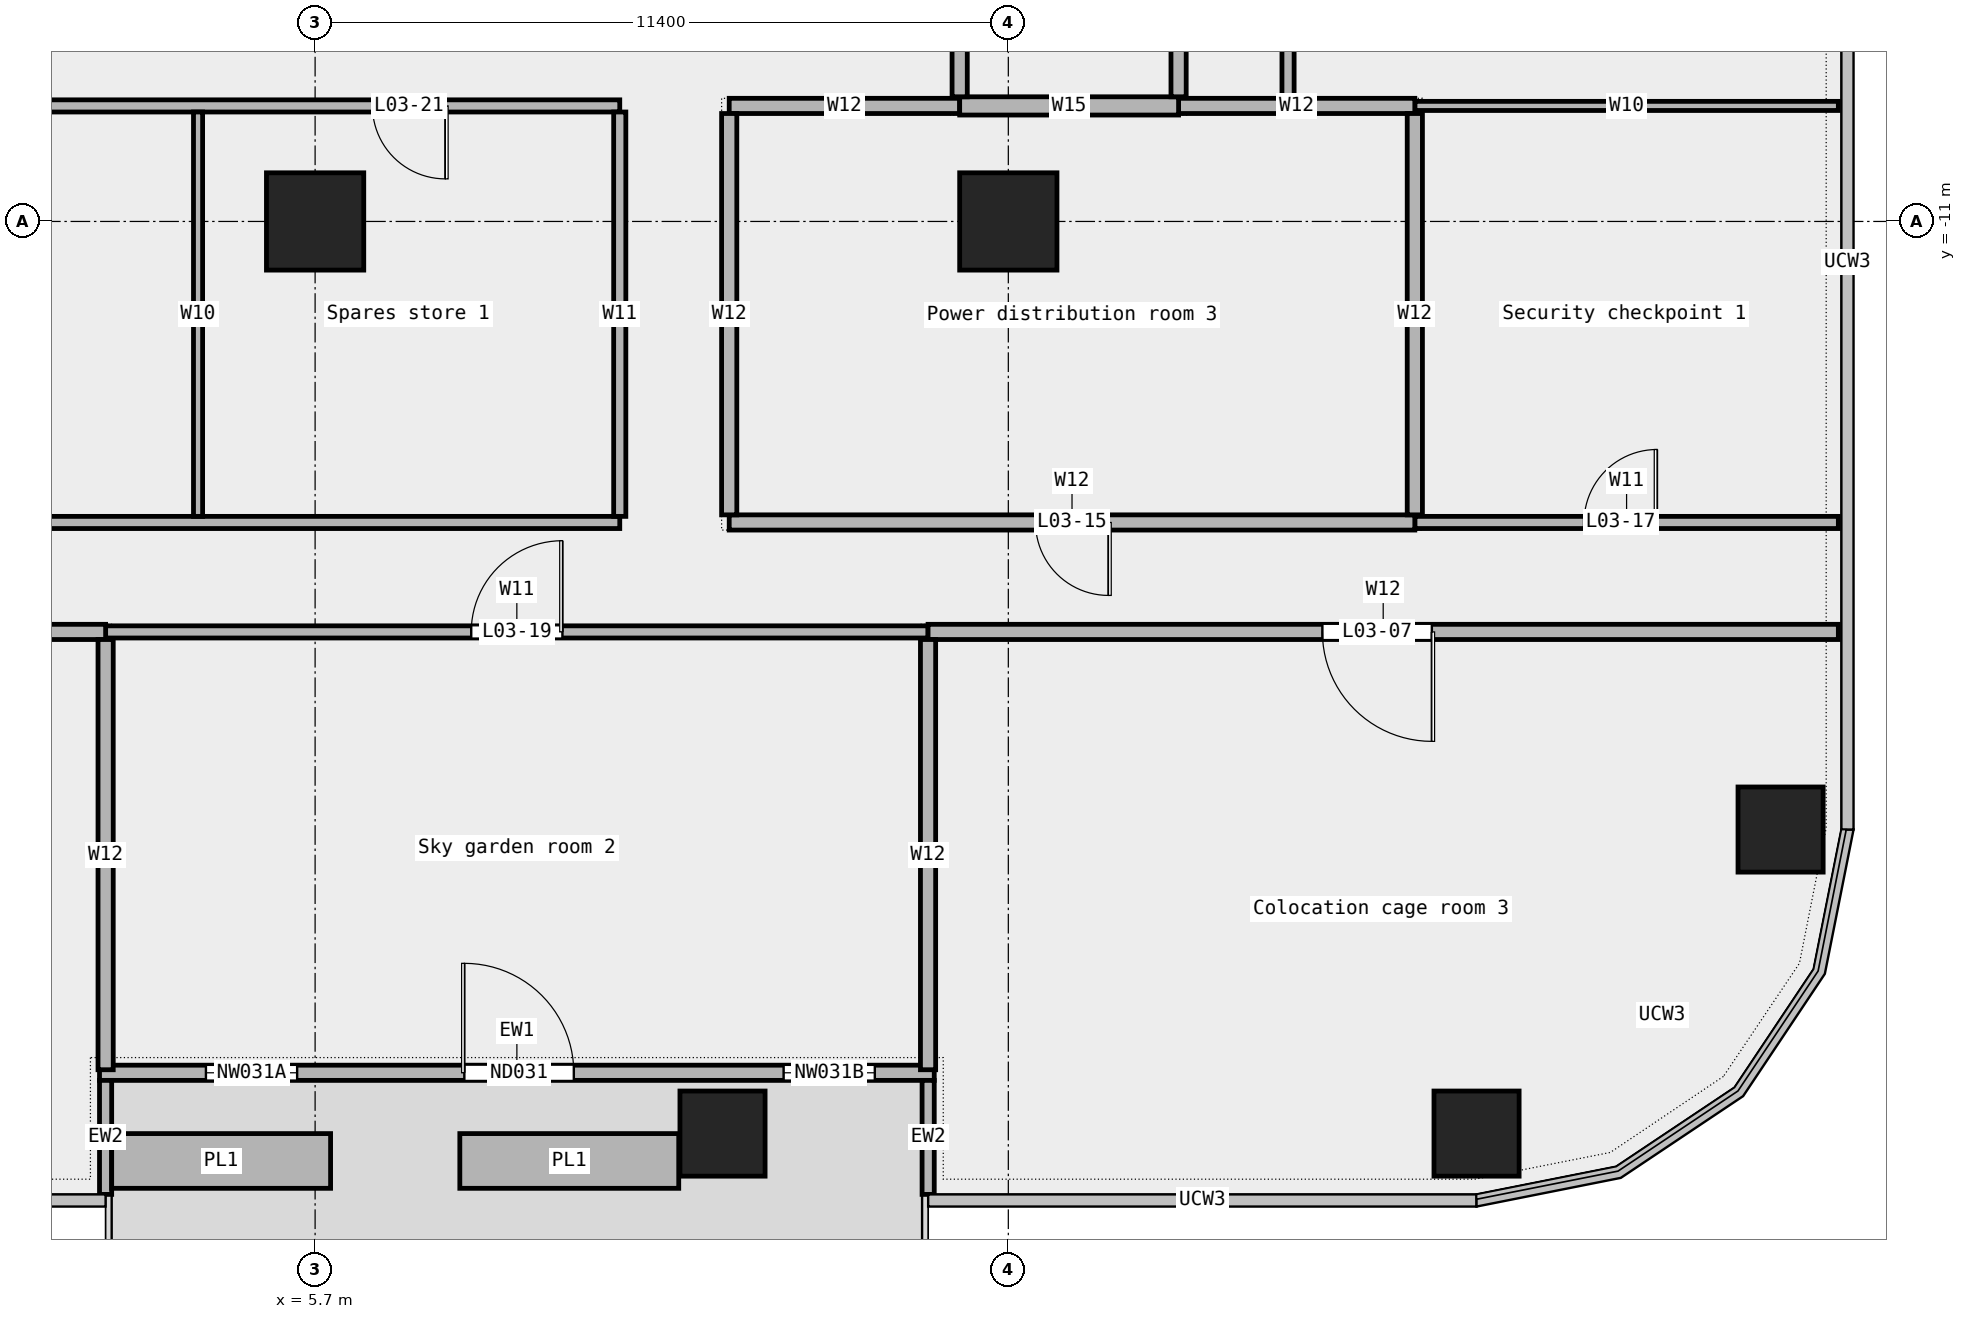
"""IFC4 building model, lengths in metres.
Left out: names, types, materials, properties, quantities, classifications, styles, units other than length and angle.
Written with IfcOpenShell. Run it as: python <this file> out.ifc"""

import sys

from ifc_helpers import new_model, si_unit, direction, frame, frame_2d, origin, origin_2d, place, context, subcontext, project, spatial, rectangle, extrude, element, fill, save


model = new_model("IFC4")
c1 = context("Model", 3, precision=1e-05, world=origin(), true_north=direction((0.0, 1.0)))
c2 = subcontext(c1, "Body", "Model", "MODEL_VIEW")
j1 = project(units=[si_unit("LENGTHUNIT", "METRE"), si_unit("PLANEANGLEUNIT", "RADIAN")], contexts=[c1])
p1 = place(None, origin())
s1 = spatial("IfcSite", under=j1, at=p1, CompositionType="ELEMENT")
p2 = place(p1, origin())
s2 = spatial("IfcBuilding", under=s1, at=p2, CompositionType="ELEMENT")
p3 = place(p2, frame((0.0, 0.0, 20.0)))
s3 = spatial("IfcBuildingStorey", under=s2, at=p3, CompositionType="ELEMENT", Elevation=20.0)
for number, where, z_axis, x_axis in (
    (1, (12.4, -26.0, 0.0), (0.0, 0.0, 1.0), (1.0, 0.0, 0.0)),
    (2, (24.8, -26.0, 0.0), (0.0, 0.0, 1.0), (1.0, 0.0, 0.0)),
    (3, (29.8, -21.0, 0.0), (0.0, 0.0, 1.0), (1.0, 0.0, 0.0)),
):
    element("IfcColumn", number, at=place(p3, frame(where, z_axis=z_axis, x_axis=x_axis)), inside=s3, PredefinedType="COLUMN", context=c2, shape_type="SweptSolid", body=[
        extrude(rectangle(XDim=1.4, YDim=1.4, at=origin_2d()), origin(), (0.0, 0.0, 1.0), 5.0),
    ])
for number, where, z_axis, x_axis in (
    (4, (5.7, -11.0, 0.0), (0.0, 0.0, 1.0), (1.0, 0.0, 0.0)),
    (5, (17.1, -11.0, 0.0), (0.0, 0.0, 1.0), (1.0, 0.0, 0.0)),
):
    element("IfcColumn", number, at=place(p3, frame(where, z_axis=z_axis, x_axis=x_axis)), inside=s3, PredefinedType="COLUMN", context=c2, shape_type="SweptSolid", body=[
        extrude(rectangle(XDim=1.6, YDim=1.6, at=origin_2d()), origin(), (0.0, 0.0, 1.0), 5.0),
    ])
p4 = place(p3, frame((2.155, -25.0, 0.0), z_axis=(0.0, 0.0, 1.0), x_axis=(1.0, 0.0, 0.0)))
e6 = element("IfcWall", 6, at=p4, inside=s3, PredefinedType="STANDARD", context=c2, shape_type="SweptSolid", body=[
    extrude(rectangle(XDim=13.727, YDim=0.25, at=frame_2d((6.864, 0.0))), origin(), (0.0, 0.0, 1.0), 5.0),
])
p5 = place(p4, frame((1.75, 0.0, 0.45)))
e7 = element("IfcOpeningElement", 7, at=p5, cuts=e6, PredefinedType="OPENING", context=c2, shape_type="SweptSolid", body=[
    extrude(rectangle(XDim=1.5, YDim=3.0, at=frame_2d((0.75, 1.5))), frame((0.0, 0.137, 0.0), z_axis=(0.0, -1.0, 0.0), x_axis=(1.0, 0.0, 0.0)), (0.0, 0.0, 1.0), 0.274),
])
p6 = place(p4, frame((6.0, 0.0, 0.0)))
e8 = element("IfcOpeningElement", 8, at=p6, cuts=e6, PredefinedType="OPENING", context=c2, shape_type="SweptSolid", body=[
    extrude(rectangle(XDim=1.8, YDim=2.4, at=frame_2d((0.9, 1.2))), frame((0.0, 0.137, 0.0), z_axis=(0.0, -1.0, 0.0), x_axis=(1.0, 0.0, 0.0)), (0.0, 0.0, 1.0), 0.274),
])
p7 = place(p4, frame((11.25, 0.0, 0.45)))
e9 = element("IfcOpeningElement", 9, at=p7, cuts=e6, PredefinedType="OPENING", context=c2, shape_type="SweptSolid", body=[
    extrude(rectangle(XDim=1.5, YDim=3.0, at=frame_2d((0.75, 1.5))), frame((0.0, 0.137, 0.0), z_axis=(0.0, -1.0, 0.0), x_axis=(1.0, 0.0, 0.0)), (0.0, 0.0, 1.0), 0.274),
])
for number, where, z_axis, x_axis in (
    (10, (2.255, -27.0, 0.0), (0.0, 0.0, 1.0), (0.0, 1.0, 0.0)),
    (11, (15.782, -27.0, 0.0), (0.0, 0.0, 1.0), (0.0, 1.0, 0.0)),
):
    element("IfcWall", number, at=place(p3, frame(where, z_axis=z_axis, x_axis=x_axis)), inside=s3, PredefinedType="STANDARD", context=c2, shape_type="SweptSolid", body=[
        extrude(rectangle(XDim=1.875, YDim=0.2, at=frame_2d((0.938, 0.0))), origin(), (0.0, 0.0, 1.0), 5.0),
    ])
for number, where, z_axis, x_axis in (
    (12, (2.354, -26.45, 0.0), (0.0, 0.0, 1.0), (1.0, 0.0, 0.0)),
    (13, (8.08, -26.45, 0.0), (0.0, 0.0, 1.0), (1.0, 0.0, 0.0)),
):
    element("IfcWall", number, at=place(p3, frame(where, z_axis=z_axis, x_axis=x_axis)), inside=s3, PredefinedType="STANDARD", context=c2, shape_type="SweptSolid", body=[
        extrude(rectangle(XDim=3.6, YDim=0.9, at=frame_2d((1.8, 0.0))), origin(), (0.0, 0.0, 1.0), 0.7),
    ])
p8 = place(p3, frame((2.255, -17.75, 0.0), z_axis=(0.0, 0.0, 1.0), x_axis=(1.0, 0.0, 0.0)))
e14 = element("IfcWall", 14, at=p8, inside=s3, PredefinedType="PARTITIONING", context=c2, shape_type="SweptSolid", body=[
    extrude(rectangle(XDim=13.525, YDim=0.2, at=frame_2d((6.763, 0.0))), origin(), (0.0, 0.0, 1.0), 5.0),
])
p9 = place(p8, frame((6.012, 0.0, 0.0)))
e15 = element("IfcOpeningElement", 15, at=p9, cuts=e14, PredefinedType="OPENING", context=c2, shape_type="SweptSolid", body=[
    extrude(rectangle(XDim=1.5, YDim=2.1, at=frame_2d((0.75, 1.05))), frame((0.0, 0.112, 0.0), z_axis=(0.0, -1.0, 0.0), x_axis=(1.0, 0.0, 0.0)), (0.0, 0.0, 1.0), 0.224),
])
p10 = place(p3, frame((-30.75, -17.75, 0.0), z_axis=(0.0, 0.0, 1.0), x_axis=(1.0, 0.0, 0.0)))
e16 = element("IfcWall", 16, at=p10, inside=s3, PredefinedType="PARTITIONING", context=c2, shape_type="SweptSolid", body=[
    extrude(rectangle(XDim=33.005, YDim=0.25, at=frame_2d((16.502, 0.0))), origin(), (0.0, 0.0, 1.0), 5.0),
])
p11 = place(p10, frame((27.752, 0.0, 0.0)))
e17 = element("IfcOpeningElement", 17, at=p11, cuts=e16, PredefinedType="OPENING", context=c2, shape_type="SweptSolid", body=[
    extrude(rectangle(XDim=1.2, YDim=2.1, at=frame_2d((0.6, 1.05))), frame((0.0, 0.137, 0.0), z_axis=(0.0, -1.0, 0.0), x_axis=(1.0, 0.0, 0.0)), (0.0, 0.0, 1.0), 0.274),
])
p12 = place(p10, frame((11.05, 0.0, 0.0)))
e18 = element("IfcOpeningElement", 18, at=p12, cuts=e16, PredefinedType="OPENING", context=c2, shape_type="SweptSolid", body=[
    extrude(rectangle(XDim=1.8, YDim=2.1, at=frame_2d((0.9, 1.05))), frame((0.0, 0.137, 0.0), z_axis=(0.0, -1.0, 0.0), x_axis=(1.0, 0.0, 0.0)), (0.0, 0.0, 1.0), 0.274),
])
p13 = place(p3, frame((15.78, -17.75, 0.0), z_axis=(0.0, 0.0, 1.0), x_axis=(1.0, 0.0, 0.0)))
e19 = element("IfcWall", 19, at=p13, inside=s3, PredefinedType="PARTITIONING", context=c2, shape_type="SweptSolid", body=[
    extrude(rectangle(XDim=14.97, YDim=0.25, at=frame_2d((7.485, 0.0))), origin(), (0.0, 0.0, 1.0), 5.0),
])
p14 = place(p13, frame((6.485, 0.0, 0.0)))
e20 = element("IfcOpeningElement", 20, at=p14, cuts=e19, PredefinedType="OPENING", context=c2, shape_type="SweptSolid", body=[
    extrude(rectangle(XDim=1.8, YDim=2.1, at=frame_2d((0.9, 1.05))), frame((0.0, 0.137, 0.0), z_axis=(0.0, -1.0, 0.0), x_axis=(1.0, 0.0, 0.0)), (0.0, 0.0, 1.0), 0.274),
])
p15 = place(p3, frame((-10.1, -15.95, 0.0), z_axis=(0.0, 0.0, 1.0), x_axis=(1.0, 0.0, 0.0)))
e21 = element("IfcWall", 21, at=p15, inside=s3, PredefinedType="PARTITIONING", context=c2, shape_type="SweptSolid", body=[
    extrude(rectangle(XDim=20.81, YDim=0.2, at=frame_2d((10.405, 0.0))), origin(), (0.0, 0.0, 1.0), 5.0),
])
p16 = place(p3, frame((23.785, -15.95, 0.0), z_axis=(0.0, 0.0, 1.0), x_axis=(1.0, 0.0, 0.0)))
e22 = element("IfcWall", 22, at=p16, inside=s3, PredefinedType="PARTITIONING", context=c2, shape_type="SweptSolid", body=[
    extrude(rectangle(XDim=6.965, YDim=0.2, at=frame_2d((3.482, 0.0))), origin(), (0.0, 0.0, 1.0), 5.0),
])
p17 = place(p16, frame((2.782, 0.0, 0.0)))
e23 = element("IfcOpeningElement", 23, at=p17, cuts=e22, PredefinedType="OPENING", context=c2, shape_type="SweptSolid", body=[
    extrude(rectangle(XDim=1.2, YDim=2.1, at=frame_2d((0.6, 1.05))), frame((0.0, 0.112, 0.0), z_axis=(0.0, -1.0, 0.0), x_axis=(1.0, 0.0, 0.0)), (0.0, 0.0, 1.0), 0.224),
])
p18 = place(p3, frame((12.51, -15.95, 0.0), z_axis=(0.0, 0.0, 1.0), x_axis=(1.0, 0.0, 0.0)))
e24 = element("IfcWall", 24, at=p18, inside=s3, PredefinedType="PARTITIONING", context=c2, shape_type="SweptSolid", body=[
    extrude(rectangle(XDim=11.275, YDim=0.25, at=frame_2d((5.637, 0.0))), origin(), (0.0, 0.0, 1.0), 5.0),
])
p19 = place(p18, frame((5.038, 0.0, 0.0)))
e25 = element("IfcOpeningElement", 25, at=p19, cuts=e24, PredefinedType="OPENING", context=c2, shape_type="SweptSolid", body=[
    extrude(rectangle(XDim=1.2, YDim=2.1, at=frame_2d((0.6, 1.05))), frame((0.0, 0.137, 0.0), z_axis=(0.0, -1.0, 0.0), x_axis=(1.0, 0.0, 0.0)), (0.0, 0.0, 1.0), 0.274),
])
p20 = place(p3, frame((23.785, -9.1, 0.0), z_axis=(0.0, 0.0, 1.0), x_axis=(1.0, 0.0, 0.0)))
e26 = element("IfcWall", 26, at=p20, inside=s3, PredefinedType="PARTITIONING", context=c2, shape_type="SweptSolid", body=[
    extrude(rectangle(XDim=6.965, YDim=0.15, at=frame_2d((3.482, 0.0))), origin(), (0.0, 0.0, 1.0), 5.0),
])
p21 = place(p3, frame((-10.1, -9.1, 0.0), z_axis=(0.0, 0.0, 1.0), x_axis=(1.0, 0.0, 0.0)))
e27 = element("IfcWall", 27, at=p21, inside=s3, PredefinedType="PARTITIONING", context=c2, shape_type="SweptSolid", body=[
    extrude(rectangle(XDim=20.81, YDim=0.2, at=frame_2d((10.405, 0.0))), origin(), (0.0, 0.0, 1.0), 5.0),
])
p22 = place(p21, frame((16.742, 0.0, 0.0)))
e28 = element("IfcOpeningElement", 28, at=p22, cuts=e27, PredefinedType="OPENING", context=c2, shape_type="SweptSolid", body=[
    extrude(rectangle(XDim=1.2, YDim=2.1, at=frame_2d((0.6, 1.05))), frame((0.0, 0.112, 0.0), z_axis=(0.0, -1.0, 0.0), x_axis=(1.0, 0.0, 0.0)), (0.0, 0.0, 1.0), 0.224),
])
p23 = place(p21, frame((6.188, 0.0, 0.0)))
e29 = element("IfcOpeningElement", 29, at=p23, cuts=e27, PredefinedType="OPENING", context=c2, shape_type="SweptSolid", body=[
    extrude(rectangle(XDim=1.5, YDim=2.1, at=frame_2d((0.75, 1.05))), frame((0.0, 0.112, 0.0), z_axis=(0.0, -1.0, 0.0), x_axis=(1.0, 0.0, 0.0)), (0.0, 0.0, 1.0), 0.224),
])
p24 = place(p3, frame((12.51, -9.1, 0.0), z_axis=(0.0, 0.0, 1.0), x_axis=(1.0, 0.0, 0.0)))
e30 = element("IfcWall", 30, at=p24, inside=s3, PredefinedType="PARTITIONING", context=c2, shape_type="SweptSolid", body=[
    extrude(rectangle(XDim=3.79, YDim=0.25, at=frame_2d((1.895, 0.0))), origin(), (0.0, 0.0, 1.0), 5.0),
])
p25 = place(p3, frame((19.9, -9.1, 0.0), z_axis=(0.0, 0.0, 1.0), x_axis=(1.0, 0.0, 0.0)))
e31 = element("IfcWall", 31, at=p25, inside=s3, PredefinedType="PARTITIONING", context=c2, shape_type="SweptSolid", body=[
    extrude(rectangle(XDim=3.885, YDim=0.25, at=frame_2d((1.942, 0.0))), origin(), (0.0, 0.0, 1.0), 5.0),
])
p26 = place(p3, frame((16.3, -9.1, 0.0), z_axis=(0.0, 0.0, 1.0), x_axis=(1.0, 0.0, 0.0)))
e32 = element("IfcWall", 32, at=p26, inside=s3, PredefinedType="PARTITIONING", context=c2, shape_type="SweptSolid", body=[
    extrude(rectangle(XDim=3.6, YDim=0.3, at=frame_2d((1.8, 0.0))), origin(), (0.0, 0.0, 1.0), 5.0),
])
p27 = place(p3, frame((2.255, -24.95, 0.0), z_axis=(0.0, 0.0, 1.0), x_axis=(0.0, 1.0, 0.0)))
e33 = element("IfcWall", 33, at=p27, inside=s3, PredefinedType="PARTITIONING", context=c2, shape_type="SweptSolid", body=[
    extrude(rectangle(XDim=7.075, YDim=0.25, at=frame_2d((3.538, 0.0))), origin(), (0.0, 0.0, 1.0), 5.0),
])
p28 = place(p3, frame((3.775, -15.85, 0.0), z_axis=(0.0, 0.0, 1.0), x_axis=(0.0, 1.0, 0.0)))
e34 = element("IfcWall", 34, at=p28, inside=s3, PredefinedType="PARTITIONING", context=c2, shape_type="SweptSolid", body=[
    extrude(rectangle(XDim=6.65, YDim=0.15, at=frame_2d((3.325, 0.0))), origin(), (0.0, 0.0, 1.0), 5.0),
])
p29 = place(p3, frame((10.71, -15.85, 0.0), z_axis=(0.0, 0.0, 1.0), x_axis=(0.0, 1.0, 0.0)))
e35 = element("IfcWall", 35, at=p29, inside=s3, PredefinedType="PARTITIONING", context=c2, shape_type="SweptSolid", body=[
    extrude(rectangle(XDim=6.65, YDim=0.2, at=frame_2d((3.325, 0.0))), origin(), (0.0, 0.0, 1.0), 5.0),
])
p30 = place(p3, frame((12.51, -15.825, 0.0), z_axis=(0.0, 0.0, 1.0), x_axis=(0.0, 1.0, 0.0)))
e36 = element("IfcWall", 36, at=p30, inside=s3, PredefinedType="PARTITIONING", context=c2, shape_type="SweptSolid", body=[
    extrude(rectangle(XDim=6.6, YDim=0.25, at=frame_2d((3.3, 0.0))), origin(), (0.0, 0.0, 1.0), 5.0),
])
p31 = place(p3, frame((15.78, -24.95, 0.0), z_axis=(0.0, 0.0, 1.0), x_axis=(0.0, 1.0, 0.0)))
e37 = element("IfcWall", 37, at=p31, inside=s3, PredefinedType="PARTITIONING", context=c2, shape_type="SweptSolid", body=[
    extrude(rectangle(XDim=7.075, YDim=0.25, at=frame_2d((3.538, 0.0))), origin(), (0.0, 0.0, 1.0), 5.0),
])
p32 = place(p3, frame((16.3, -8.95, 0.0), z_axis=(0.0, 0.0, 1.0), x_axis=(0.0, 1.0, 0.0)))
e38 = element("IfcWall", 38, at=p32, inside=s3, PredefinedType="PARTITIONING", context=c2, shape_type="SweptSolid", body=[
    extrude(rectangle(XDim=8.15, YDim=0.25, at=frame_2d((4.075, 0.0))), origin(), (0.0, 0.0, 1.0), 5.0),
])
p33 = place(p3, frame((19.9, -8.95, 0.0), z_axis=(0.0, 0.0, 1.0), x_axis=(0.0, 1.0, 0.0)))
e39 = element("IfcWall", 39, at=p33, inside=s3, PredefinedType="PARTITIONING", context=c2, shape_type="SweptSolid", body=[
    extrude(rectangle(XDim=9.875, YDim=0.25, at=frame_2d((4.938, 0.0))), origin(), (0.0, 0.0, 1.0), 5.0),
])
p34 = place(p33, frame((4.488, 0.0, 0.0)))
e40 = element("IfcOpeningElement", 40, at=p34, cuts=e39, PredefinedType="OPENING", context=c2, shape_type="SweptSolid", body=[
    extrude(rectangle(XDim=0.9, YDim=2.1, at=frame_2d((0.45, 1.05))), frame((0.0, 0.137, 0.0), z_axis=(0.0, -1.0, 0.0), x_axis=(1.0, 0.0, 0.0)), (0.0, 0.0, 1.0), 0.274),
])
p35 = place(p3, frame((21.7, -8.975, 0.0), z_axis=(0.0, 0.0, 1.0), x_axis=(0.0, 1.0, 0.0)))
e41 = element("IfcWall", 41, at=p35, inside=s3, PredefinedType="PARTITIONING", context=c2, shape_type="SweptSolid", body=[
    extrude(rectangle(XDim=20.515, YDim=0.2, at=frame_2d((10.258, 0.0))), origin(), (0.0, 0.0, 1.0), 5.0),
])
p36 = place(p35, frame((2.72, 0.0, 0.0)))
e42 = element("IfcOpeningElement", 42, at=p36, cuts=e41, PredefinedType="OPENING", context=c2, shape_type="SweptSolid", body=[
    extrude(rectangle(XDim=1.2, YDim=2.1, at=frame_2d((0.6, 1.05))), frame((0.0, 0.112, 0.0), z_axis=(0.0, -1.0, 0.0), x_axis=(1.0, 0.0, 0.0)), (0.0, 0.0, 1.0), 0.224),
])
p37 = place(p35, frame((12.827, 0.0, 0.0)))
e43 = element("IfcOpeningElement", 43, at=p37, cuts=e41, PredefinedType="OPENING", context=c2, shape_type="SweptSolid", body=[
    extrude(rectangle(XDim=1.5, YDim=2.1, at=frame_2d((0.75, 1.05))), frame((0.0, 0.112, 0.0), z_axis=(0.0, -1.0, 0.0), x_axis=(1.0, 0.0, 0.0)), (0.0, 0.0, 1.0), 0.224),
])
p38 = place(p3, frame((23.785, -15.825, 0.0), z_axis=(0.0, 0.0, 1.0), x_axis=(0.0, 1.0, 0.0)))
e44 = element("IfcWall", 44, at=p38, inside=s3, PredefinedType="PARTITIONING", context=c2, shape_type="SweptSolid", body=[
    extrude(rectangle(XDim=6.6, YDim=0.25, at=frame_2d((3.3, 0.0))), origin(), (0.0, 0.0, 1.0), 5.0),
])
p39 = place(p5, origin())
e45 = element("IfcWindow", 45, at=p39, inside=s3, PartitioningType="SINGLE_PANEL", PredefinedType="WINDOW", context=c2, shape_type="SweptSolid", body=[
    extrude(rectangle(XDim=1.5, YDim=3.0, at=frame_2d((0.75, 1.5))), frame((0.0, 0.03, 0.0), z_axis=(0.0, -1.0, 0.0), x_axis=(1.0, 0.0, 0.0)), (0.0, 0.0, 1.0), 0.06),
])
fill(e7, e45)
p40 = place(p6, origin())
e46 = element("IfcDoor", 46, at=p40, inside=s3, OperationType="DOUBLE_DOOR_SINGLE_SWING", PredefinedType="DOOR", context=c2, shape_type="SweptSolid", body=[
    extrude(rectangle(XDim=1.8, YDim=2.4, at=frame_2d((0.9, 1.2))), frame((0.0, 0.025, 0.0), z_axis=(0.0, -1.0, 0.0), x_axis=(1.0, 0.0, 0.0)), (0.0, 0.0, 1.0), 0.05),
])
fill(e8, e46)
p41 = place(p7, origin())
e47 = element("IfcWindow", 47, at=p41, inside=s3, PartitioningType="SINGLE_PANEL", PredefinedType="WINDOW", context=c2, shape_type="SweptSolid", body=[
    extrude(rectangle(XDim=1.5, YDim=3.0, at=frame_2d((0.75, 1.5))), frame((0.0, 0.03, 0.0), z_axis=(0.0, -1.0, 0.0), x_axis=(1.0, 0.0, 0.0)), (0.0, 0.0, 1.0), 0.06),
])
fill(e9, e47)
p42 = place(p14, origin())
e48 = element("IfcDoor", 48, at=p42, inside=s3, OperationType="DOUBLE_DOOR_SINGLE_SWING", PredefinedType="DOOR", context=c2, shape_type="SweptSolid", body=[
    extrude(rectangle(XDim=1.8, YDim=2.1, at=frame_2d((0.9, 1.05))), frame((0.0, 0.025, 0.0), z_axis=(0.0, -1.0, 0.0), x_axis=(1.0, 0.0, 0.0)), (0.0, 0.0, 1.0), 0.05),
])
fill(e20, e48)
p43 = place(p19, origin())
e49 = element("IfcDoor", 49, at=p43, inside=s3, OperationType="SINGLE_SWING_LEFT", PredefinedType="DOOR", context=c2, shape_type="SweptSolid", body=[
    extrude(rectangle(XDim=1.2, YDim=2.1, at=frame_2d((0.6, 1.05))), frame((0.0, 0.025, 0.0), z_axis=(0.0, -1.0, 0.0), x_axis=(1.0, 0.0, 0.0)), (0.0, 0.0, 1.0), 0.05),
])
fill(e25, e49)
p44 = place(p17, origin())
e50 = element("IfcDoor", 50, at=p44, inside=s3, OperationType="SINGLE_SWING_RIGHT", PredefinedType="DOOR", context=c2, shape_type="SweptSolid", body=[
    extrude(rectangle(XDim=1.2, YDim=2.1, at=frame_2d((0.6, 1.05))), frame((0.0, 0.025, 0.0), z_axis=(0.0, -1.0, 0.0), x_axis=(1.0, 0.0, 0.0)), (0.0, 0.0, 1.0), 0.05),
])
fill(e23, e50)
p45 = place(p9, origin())
e51 = element("IfcDoor", 51, at=p45, inside=s3, OperationType="DOUBLE_DOOR_SINGLE_SWING", PredefinedType="DOOR", context=c2, shape_type="SweptSolid", body=[
    extrude(rectangle(XDim=1.5, YDim=2.1, at=frame_2d((0.75, 1.05))), frame((0.0, 0.025, 0.0), z_axis=(0.0, -1.0, 0.0), x_axis=(1.0, 0.0, 0.0)), (0.0, 0.0, 1.0), 0.05),
])
fill(e15, e51)
p46 = place(p22, origin())
e52 = element("IfcDoor", 52, at=p46, inside=s3, OperationType="SINGLE_SWING_LEFT", PredefinedType="DOOR", context=c2, shape_type="SweptSolid", body=[
    extrude(rectangle(XDim=1.2, YDim=2.1, at=frame_2d((0.6, 1.05))), frame((0.0, 0.025, 0.0), z_axis=(0.0, -1.0, 0.0), x_axis=(1.0, 0.0, 0.0)), (0.0, 0.0, 1.0), 0.05),
])
fill(e28, e52)
save(model, sys.argv[1])
